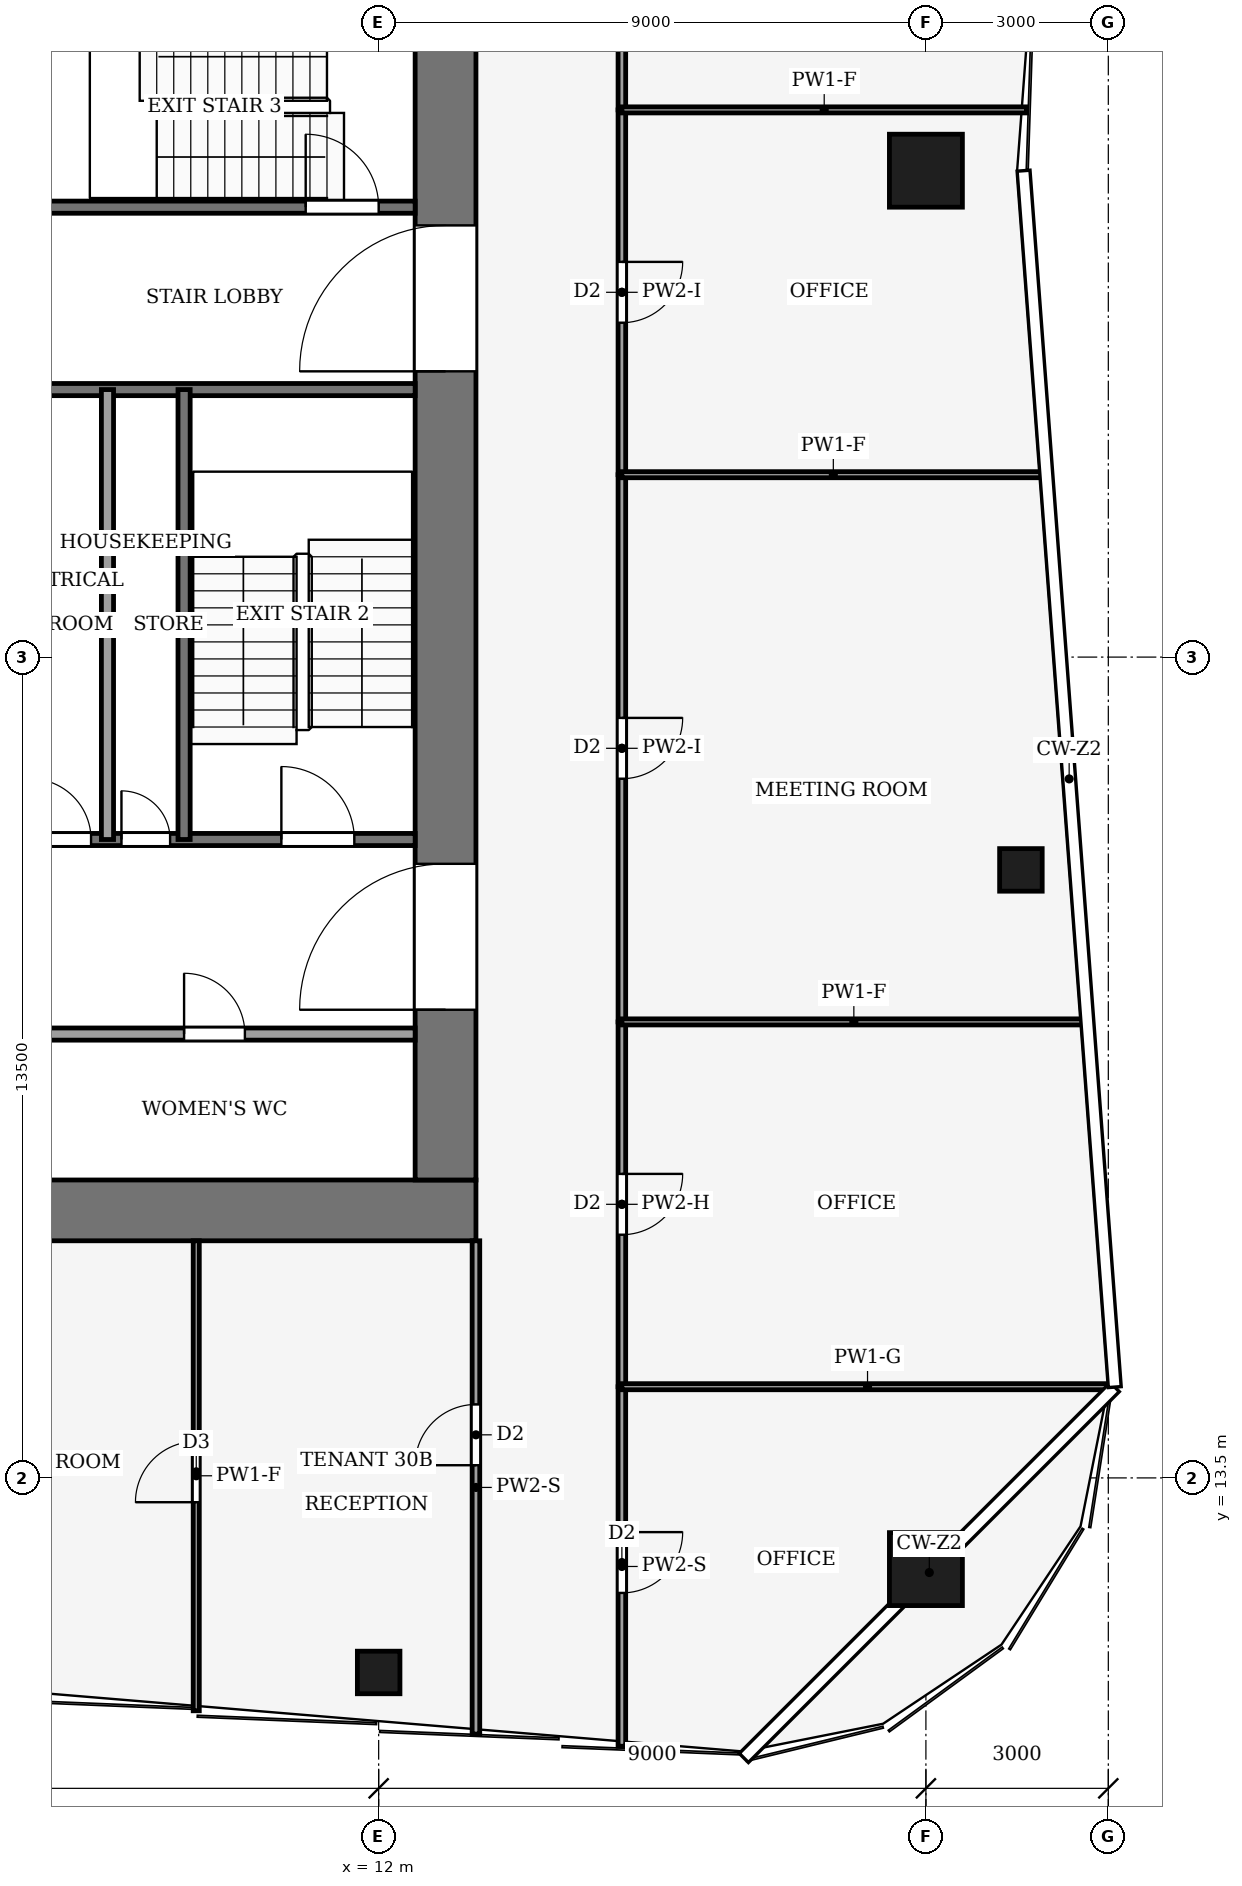
"""IFC4 building model, lengths in metres.
Left out: names, types, materials, properties, quantities, classifications, styles, units other than length and angle.
Written with IfcOpenShell. Run it as: python <this file> out.ifc"""

import sys

from ifc_helpers import new_model, si_unit, direction, frame, frame_2d, origin, origin_2d, place, context, subcontext, project, spatial, rectangle, hollow_rectangle, extrude, element, fill, save


model = new_model("IFC4")
c1 = context("Model", 3, precision=1e-05, world=origin(), true_north=direction((0.0, 1.0)))
c2 = subcontext(c1, "Body", "Model", "MODEL_VIEW")
j1 = project(units=[si_unit("LENGTHUNIT", "METRE"), si_unit("PLANEANGLEUNIT", "RADIAN")], contexts=[c1])
p1 = place(None, origin())
s1 = spatial("IfcSite", under=j1, at=p1, CompositionType="ELEMENT")
p2 = place(p1, origin())
s2 = spatial("IfcBuilding", under=s1, at=p2, CompositionType="ELEMENT")
p3 = place(p2, frame((0.0, 0.0, 134.0)))
s3 = spatial("IfcBuildingStorey", under=s2, at=p3, CompositionType="ELEMENT", Elevation=134.0)
p4 = place(p3, frame((-13.6, 17.9, -0.13), z_axis=(0.0, 0.0, 1.0), x_axis=(1.0, 0.0, 0.0)))
e1 = element("IfcWall", 1, at=p4, inside=s3, PredefinedType="SHEAR", context=c2, shape_type="SweptSolid", body=[
    extrude(rectangle(XDim=27.2, YDim=1.0, at=frame_2d((13.6, 0.0))), origin(), (0.0, 0.0, 1.0), 4.0),
])
p5 = place(p3, frame((13.1, 18.4, -0.13), z_axis=(0.0, 0.0, 1.0), x_axis=(0.0, 1.0, 0.0)))
e2 = element("IfcWall", 2, at=p5, inside=s3, PredefinedType="SHEAR", context=c2, shape_type="SweptSolid", body=[
    extrude(rectangle(XDim=19.2, YDim=1.0, at=frame_2d((9.6, 0.0))), origin(), (0.0, 0.0, 1.0), 4.0),
])
p6 = place(p5, frame((2.8, 0.0, 0.13)))
e3 = element("IfcOpeningElement", 3, at=p6, cuts=e2, PredefinedType="OPENING", context=c2, shape_type="SweptSolid", body=[
    extrude(rectangle(XDim=2.4, YDim=2.4, at=frame_2d((1.2, 1.2))), frame((0.0, 0.51, 0.0), z_axis=(0.0, -1.0, 0.0), x_axis=(1.0, 0.0, 0.0)), (0.0, 0.0, 1.0), 1.02),
])
p7 = place(p5, frame((13.3, 0.0, 0.13)))
e4 = element("IfcOpeningElement", 4, at=p7, cuts=e2, PredefinedType="OPENING", context=c2, shape_type="SweptSolid", body=[
    extrude(rectangle(XDim=2.4, YDim=2.4, at=frame_2d((1.2, 1.2))), frame((0.0, 0.51, 0.0), z_axis=(0.0, -1.0, 0.0), x_axis=(1.0, 0.0, 0.0)), (0.0, 0.0, 1.0), 1.02),
])
for number, where, z_axis, x_axis in (
    (5, (21.0, 35.0, 0.0), (0.0, 0.0, 1.0), (1.0, 0.0, 0.0)),
    (6, (21.0, 12.0, 0.0), (0.0, 0.0, 1.0), (1.0, 0.0, 0.0)),
):
    element("IfcColumn", number, at=place(p3, frame(where, z_axis=z_axis, x_axis=x_axis)), inside=s3, PredefinedType="COLUMN", context=c2, shape_type="SweptSolid", body=[
        extrude(hollow_rectangle(XDim=1.2, YDim=1.2, WallThickness=0.07, at=origin_2d()), origin(), (0.0, 0.0, 1.0), 4.0),
    ])
for number, where, z_axis, x_axis in (
    (7, (12.0, 10.3, 0.0), (0.0, 0.0, 1.0), (1.0, 0.0, 0.0)),
    (8, (22.562, 23.5, 0.0), (0.0, 0.0, 1.0), (1.0, 0.0, 0.0)),
):
    element("IfcColumn", number, at=place(p3, frame(where, z_axis=z_axis, x_axis=x_axis)), inside=s3, PredefinedType="COLUMN", context=c2, shape_type="SweptSolid", body=[
        extrude(hollow_rectangle(XDim=0.7, YDim=0.7, WallThickness=0.03, at=origin_2d()), origin(), (0.0, 0.0, 1.0), 4.0),
    ])
p8 = place(p3, frame((6.0, 20.8, 0.0), z_axis=(0.0, 0.0, 1.0), x_axis=(1.0, 0.0, 0.0)))
e9 = element("IfcWall", 9, at=p8, inside=s3, PredefinedType="PARTITIONING", context=c2, shape_type="SweptSolid", body=[
    extrude(rectangle(XDim=6.6, YDim=0.2, at=frame_2d((3.3, 0.0))), origin(), (0.0, 0.0, 1.0), 3.87),
])
p9 = place(p8, frame((2.8, 0.0, 0.0)))
e10 = element("IfcOpeningElement", 10, at=p9, cuts=e9, PredefinedType="OPENING", context=c2, shape_type="SweptSolid", body=[
    extrude(rectangle(XDim=1.0, YDim=2.1, at=frame_2d((0.5, 1.05))), frame((0.0, 0.11, 0.0), z_axis=(0.0, -1.0, 0.0), x_axis=(1.0, 0.0, 0.0)), (0.0, 0.0, 1.0), 0.22),
])
p10 = place(p3, frame((6.0, 24.0, 0.0), z_axis=(0.0, 0.0, 1.0), x_axis=(1.0, 0.0, 0.0)))
e11 = element("IfcWall", 11, at=p10, inside=s3, PredefinedType="PARTITIONING", context=c2, shape_type="SweptSolid", body=[
    extrude(rectangle(XDim=6.6, YDim=0.2, at=frame_2d((3.3, 0.0))), origin(), (0.0, 0.0, 1.0), 3.87),
])
p11 = place(p10, frame((0.27, 0.0, 0.0)))
e12 = element("IfcOpeningElement", 12, at=p11, cuts=e11, PredefinedType="OPENING", context=c2, shape_type="SweptSolid", body=[
    extrude(rectangle(XDim=1.0, YDim=2.1, at=frame_2d((0.5, 1.05))), frame((0.0, 0.11, 0.0), z_axis=(0.0, -1.0, 0.0), x_axis=(1.0, 0.0, 0.0)), (0.0, 0.0, 1.0), 0.22),
])
p12 = place(p10, frame((1.77, 0.0, 0.0)))
e13 = element("IfcOpeningElement", 13, at=p12, cuts=e11, PredefinedType="OPENING", context=c2, shape_type="SweptSolid", body=[
    extrude(rectangle(XDim=0.8, YDim=2.1, at=frame_2d((0.4, 1.05))), frame((0.0, 0.11, 0.0), z_axis=(0.0, -1.0, 0.0), x_axis=(1.0, 0.0, 0.0)), (0.0, 0.0, 1.0), 0.22),
])
p13 = place(p10, frame((4.4, 0.0, 0.0)))
e14 = element("IfcOpeningElement", 14, at=p13, cuts=e11, PredefinedType="OPENING", context=c2, shape_type="SweptSolid", body=[
    extrude(rectangle(XDim=1.2, YDim=2.2, at=frame_2d((0.6, 1.1))), frame((0.0, 0.11, 0.0), z_axis=(0.0, -1.0, 0.0), x_axis=(1.0, 0.0, 0.0)), (0.0, 0.0, 1.0), 0.22),
])
p14 = place(p3, frame((6.0, 31.4, 0.0), z_axis=(0.0, 0.0, 1.0), x_axis=(1.0, 0.0, 0.0)))
e15 = element("IfcWall", 15, at=p14, inside=s3, PredefinedType="PARTITIONING", context=c2, shape_type="SweptSolid", body=[
    extrude(rectangle(XDim=6.6, YDim=0.2, at=frame_2d((3.3, 0.0))), origin(), (0.0, 0.0, 1.0), 3.87),
])
p15 = place(p3, frame((6.0, 34.4, 0.0), z_axis=(0.0, 0.0, 1.0), x_axis=(1.0, 0.0, 0.0)))
e16 = element("IfcWall", 16, at=p15, inside=s3, PredefinedType="PARTITIONING", context=c2, shape_type="SweptSolid", body=[
    extrude(rectangle(XDim=6.6, YDim=0.2, at=frame_2d((3.3, 0.0))), origin(), (0.0, 0.0, 1.0), 3.87),
])
p16 = place(p15, frame((4.8, 0.0, 0.0)))
e17 = element("IfcOpeningElement", 17, at=p16, cuts=e16, PredefinedType="OPENING", context=c2, shape_type="SweptSolid", body=[
    extrude(rectangle(XDim=1.2, YDim=2.2, at=frame_2d((0.6, 1.1))), frame((0.0, 0.11, 0.0), z_axis=(0.0, -1.0, 0.0), x_axis=(1.0, 0.0, 0.0)), (0.0, 0.0, 1.0), 0.22),
])
for number, where, z_axis, x_axis in (
    (18, (7.54, 24.0, 0.0), (0.0, 0.0, 1.0), (0.0, 1.0, 0.0)),
    (19, (8.8, 24.0, 0.0), (0.0, 0.0, 1.0), (0.0, 1.0, 0.0)),
):
    element("IfcWall", number, at=place(p3, frame(where, z_axis=z_axis, x_axis=x_axis)), inside=s3, PredefinedType="PARTITIONING", context=c2, shape_type="SweptSolid", body=[
        extrude(rectangle(XDim=7.4, YDim=0.2, at=frame_2d((3.7, 0.0))), origin(), (0.0, 0.0, 1.0), 3.87),
    ])
p17 = place(p3, frame((16.0, 15.0, 0.0), z_axis=(0.0, 0.0, 1.0), x_axis=(0.0, -1.0, 0.0)))
e20 = element("IfcWall", 20, at=p17, inside=s3, PredefinedType="PARTITIONING", context=c2, shape_type="SweptSolid", body=[
    extrude(rectangle(XDim=5.913, YDim=0.125, at=frame_2d((2.957, 0.0))), origin(), (0.0, 0.0, 1.0), 3.04),
])
p18 = place(p17, frame((2.392, 0.0, 0.0)))
e21 = element("IfcOpeningElement", 21, at=p18, cuts=e20, PredefinedType="OPENING", context=c2, shape_type="SweptSolid", body=[
    extrude(rectangle(XDim=1.0, YDim=2.1, at=frame_2d((0.5, 1.05))), frame((0.0, 0.073, 0.0), z_axis=(0.0, -1.0, 0.0), x_axis=(1.0, 0.0, 0.0)), (0.0, 0.0, 1.0), 0.145),
])
p19 = place(p3, frame((16.0, 21.0, 0.0), z_axis=(0.0, 0.0, 1.0), x_axis=(0.0, -1.0, 0.0)))
e22 = element("IfcWall", 22, at=p19, inside=s3, PredefinedType="PARTITIONING", context=c2, shape_type="SweptSolid", body=[
    extrude(rectangle(XDim=6.0, YDim=0.125, at=frame_2d((3.0, 0.0))), origin(), (0.0, 0.0, 1.0), 3.14),
])
p20 = place(p19, frame((2.5, 0.0, 0.0)))
e23 = element("IfcOpeningElement", 23, at=p20, cuts=e22, PredefinedType="OPENING", context=c2, shape_type="SweptSolid", body=[
    extrude(rectangle(XDim=1.0, YDim=2.1, at=frame_2d((0.5, 1.05))), frame((0.0, 0.073, 0.0), z_axis=(0.0, -1.0, 0.0), x_axis=(1.0, 0.0, 0.0)), (0.0, 0.0, 1.0), 0.145),
])
p21 = place(p3, frame((16.0, 30.0, 0.0), z_axis=(0.0, 0.0, 1.0), x_axis=(0.0, -1.0, 0.0)))
e24 = element("IfcWall", 24, at=p21, inside=s3, PredefinedType="PARTITIONING", context=c2, shape_type="SweptSolid", body=[
    extrude(rectangle(XDim=9.0, YDim=0.125, at=frame_2d((4.5, 0.0))), origin(), (0.0, 0.0, 1.0), 3.48),
])
p22 = place(p21, frame((4.0, 0.0, 0.0)))
e25 = element("IfcOpeningElement", 25, at=p22, cuts=e24, PredefinedType="OPENING", context=c2, shape_type="SweptSolid", body=[
    extrude(rectangle(XDim=1.0, YDim=2.1, at=frame_2d((0.5, 1.05))), frame((0.0, 0.073, 0.0), z_axis=(0.0, -1.0, 0.0), x_axis=(1.0, 0.0, 0.0)), (0.0, 0.0, 1.0), 0.145),
])
p23 = place(p3, frame((16.0, 36.0, 0.0), z_axis=(0.0, 0.0, 1.0), x_axis=(0.0, -1.0, 0.0)))
e26 = element("IfcWall", 26, at=p23, inside=s3, PredefinedType="PARTITIONING", context=c2, shape_type="SweptSolid", body=[
    extrude(rectangle(XDim=6.0, YDim=0.125, at=frame_2d((3.0, 0.0))), origin(), (0.0, 0.0, 1.0), 3.48),
])
p24 = place(p23, frame((2.5, 0.0, 0.0)))
e27 = element("IfcOpeningElement", 27, at=p24, cuts=e26, PredefinedType="OPENING", context=c2, shape_type="SweptSolid", body=[
    extrude(rectangle(XDim=1.0, YDim=2.1, at=frame_2d((0.5, 1.05))), frame((0.0, 0.073, 0.0), z_axis=(0.0, -1.0, 0.0), x_axis=(1.0, 0.0, 0.0)), (0.0, 0.0, 1.0), 0.145),
])
p25 = place(p3, frame((16.0, 41.004, 0.0), z_axis=(0.0, 0.0, 1.0), x_axis=(0.0, -1.0, 0.0)))
e28 = element("IfcWall", 28, at=p25, inside=s3, PredefinedType="PARTITIONING", context=c2, shape_type="SweptSolid", body=[
    extrude(rectangle(XDim=5.004, YDim=0.125, at=frame_2d((2.502, 0.0))), origin(), (0.0, 0.0, 1.0), 3.14),
])
p26 = place(p25, frame((2.002, 0.0, 0.0)))
e29 = element("IfcOpeningElement", 29, at=p26, cuts=e28, PredefinedType="OPENING", context=c2, shape_type="SweptSolid", body=[
    extrude(rectangle(XDim=1.0, YDim=2.1, at=frame_2d((0.5, 1.05))), frame((0.0, 0.073, 0.0), z_axis=(0.0, -1.0, 0.0), x_axis=(1.0, 0.0, 0.0)), (0.0, 0.0, 1.0), 0.145),
])
p27 = place(p3, frame((13.6, 9.287, 0.0), z_axis=(0.0, 0.0, 1.0), x_axis=(0.0, 1.0, 0.0)))
e30 = element("IfcWall", 30, at=p27, inside=s3, PredefinedType="PARTITIONING", context=c2, shape_type="SweptSolid", body=[
    extrude(rectangle(XDim=8.113, YDim=0.125, at=frame_2d((4.057, 0.0))), origin(), (0.0, 0.0, 1.0), 3.04),
])
p28 = place(p27, frame((4.422, 0.0, 0.0)))
e31 = element("IfcOpeningElement", 31, at=p28, cuts=e30, PredefinedType="OPENING", context=c2, shape_type="SweptSolid", body=[
    extrude(rectangle(XDim=1.0, YDim=2.1, at=frame_2d((0.5, 1.05))), frame((0.0, 0.073, 0.0), z_axis=(0.0, -1.0, 0.0), x_axis=(1.0, 0.0, 0.0)), (0.0, 0.0, 1.0), 0.145),
])
p29 = place(p3, frame((24.08, 15.0, 0.0), z_axis=(0.0, 0.0, 1.0), x_axis=(-1.0, 0.0, 0.0)))
e32 = element("IfcWall", 32, at=p29, inside=s3, PredefinedType="PARTITIONING", context=c2, shape_type="SweptSolid", body=[
    extrude(rectangle(XDim=8.08, YDim=0.1, at=frame_2d((4.04, 0.0))), origin(), (0.0, 0.0, 1.0), 2.93),
])
p30 = place(p3, frame((23.63, 21.0, 0.0), z_axis=(0.0, 0.0, 1.0), x_axis=(-1.0, 0.0, 0.0)))
e33 = element("IfcWall", 33, at=p30, inside=s3, PredefinedType="PARTITIONING", context=c2, shape_type="SweptSolid", body=[
    extrude(rectangle(XDim=7.63, YDim=0.1, at=frame_2d((3.815, 0.0))), origin(), (0.0, 0.0, 1.0), 3.04),
])
p31 = place(p3, frame((22.955, 30.0, 0.0), z_axis=(0.0, 0.0, 1.0), x_axis=(-1.0, 0.0, 0.0)))
e34 = element("IfcWall", 34, at=p31, inside=s3, PredefinedType="PARTITIONING", context=c2, shape_type="SweptSolid", body=[
    extrude(rectangle(XDim=6.955, YDim=0.1, at=frame_2d((3.478, 0.0))), origin(), (0.0, 0.0, 1.0), 3.04),
])
p32 = place(p3, frame((22.655, 36.0, 0.0), z_axis=(0.0, 0.0, 1.0), x_axis=(-1.0, 0.0, 0.0)))
e35 = element("IfcWall", 35, at=p32, inside=s3, PredefinedType="PARTITIONING", context=c2, shape_type="SweptSolid", body=[
    extrude(rectangle(XDim=6.655, YDim=0.1, at=frame_2d((3.328, 0.0))), origin(), (0.0, 0.0, 1.0), 3.04),
])
p33 = place(p3, frame((9.0, 9.67, 0.0), z_axis=(0.0, 0.0, 1.0), x_axis=(0.0, 1.0, 0.0)))
e36 = element("IfcWall", 36, at=p33, inside=s3, PredefinedType="PARTITIONING", context=c2, shape_type="SweptSolid", body=[
    extrude(rectangle(XDim=7.73, YDim=0.1, at=frame_2d((3.865, 0.0))), origin(), (0.0, 0.0, 1.0), 3.04),
])
p34 = place(p33, frame((3.43, 0.0, 0.0)))
e37 = element("IfcOpeningElement", 37, at=p34, cuts=e36, PredefinedType="OPENING", context=c2, shape_type="SweptSolid", body=[
    extrude(rectangle(XDim=1.0, YDim=2.1, at=frame_2d((0.5, 1.05))), frame((0.0, 0.06, 0.0), z_axis=(0.0, -1.0, 0.0), x_axis=(1.0, 0.0, 0.0)), (0.0, 0.0, 1.0), 0.12),
])
p35 = place(p9, origin())
e38 = element("IfcDoor", 38, at=p35, inside=s3, OperationType="SINGLE_SWING_RIGHT", PredefinedType="DOOR", context=c2, shape_type="SweptSolid", body=[
    extrude(rectangle(XDim=1.0, YDim=2.1, at=frame_2d((0.5, 1.05))), frame((0.0, 0.025, 0.0), z_axis=(0.0, -1.0, 0.0), x_axis=(1.0, 0.0, 0.0)), (0.0, 0.0, 1.0), 0.05),
])
fill(e10, e38)
p36 = place(p11, origin())
e39 = element("IfcDoor", 39, at=p36, inside=s3, OperationType="SINGLE_SWING_RIGHT", PredefinedType="DOOR", context=c2, shape_type="SweptSolid", body=[
    extrude(rectangle(XDim=1.0, YDim=2.1, at=frame_2d((0.5, 1.05))), frame((0.0, 0.025, 0.0), z_axis=(0.0, -1.0, 0.0), x_axis=(1.0, 0.0, 0.0)), (0.0, 0.0, 1.0), 0.05),
])
fill(e12, e39)
p37 = place(p12, origin())
e40 = element("IfcDoor", 40, at=p37, inside=s3, OperationType="SINGLE_SWING_LEFT", PredefinedType="DOOR", context=c2, shape_type="SweptSolid", body=[
    extrude(rectangle(XDim=0.8, YDim=2.1, at=frame_2d((0.4, 1.05))), frame((0.0, 0.025, 0.0), z_axis=(0.0, -1.0, 0.0), x_axis=(1.0, 0.0, 0.0)), (0.0, 0.0, 1.0), 0.05),
])
fill(e13, e40)
p38 = place(p13, origin())
e41 = element("IfcDoor", 41, at=p38, inside=s3, OperationType="SINGLE_SWING_RIGHT", PredefinedType="DOOR", context=c2, shape_type="SweptSolid", body=[
    extrude(rectangle(XDim=1.2, YDim=2.2, at=frame_2d((0.6, 1.1))), frame((0.0, 0.025, 0.0), z_axis=(0.0, -1.0, 0.0), x_axis=(1.0, 0.0, 0.0)), (0.0, 0.0, 1.0), 0.05),
])
fill(e14, e41)
p39 = place(p16, origin())
e42 = element("IfcDoor", 42, at=p39, inside=s3, OperationType="SINGLE_SWING_LEFT", PredefinedType="DOOR", context=c2, shape_type="SweptSolid", body=[
    extrude(rectangle(XDim=1.2, YDim=2.2, at=frame_2d((0.6, 1.1))), frame((0.0, 0.025, 0.0), z_axis=(0.0, -1.0, 0.0), x_axis=(1.0, 0.0, 0.0)), (0.0, 0.0, 1.0), 0.05),
])
fill(e17, e42)
p40 = place(p6, origin())
e43 = element("IfcDoor", 43, at=p40, inside=s3, OperationType="DOUBLE_DOOR_SINGLE_SWING", PredefinedType="DOOR", context=c2, shape_type="SweptSolid", body=[
    extrude(rectangle(XDim=2.4, YDim=2.4, at=frame_2d((1.2, 1.2))), frame((0.0, 0.025, 0.0), z_axis=(0.0, -1.0, 0.0), x_axis=(1.0, 0.0, 0.0)), (0.0, 0.0, 1.0), 0.05),
])
fill(e3, e43)
p41 = place(p7, origin())
e44 = element("IfcDoor", 44, at=p41, inside=s3, OperationType="DOUBLE_DOOR_SINGLE_SWING", PredefinedType="DOOR", context=c2, shape_type="SweptSolid", body=[
    extrude(rectangle(XDim=2.4, YDim=2.4, at=frame_2d((1.2, 1.2))), frame((0.0, 0.025, 0.0), z_axis=(0.0, -1.0, 0.0), x_axis=(1.0, 0.0, 0.0)), (0.0, 0.0, 1.0), 0.05),
])
fill(e4, e44)
p42 = place(p18, origin())
e45 = element("IfcDoor", 45, at=p42, inside=s3, OperationType="SINGLE_SWING_LEFT", PredefinedType="DOOR", context=c2, shape_type="SweptSolid", body=[
    extrude(rectangle(XDim=1.0, YDim=2.1, at=frame_2d((0.5, 1.05))), frame((0.0, 0.025, 0.0), z_axis=(0.0, -1.0, 0.0), x_axis=(1.0, 0.0, 0.0)), (0.0, 0.0, 1.0), 0.05),
])
fill(e21, e45)
p43 = place(p20, origin())
e46 = element("IfcDoor", 46, at=p43, inside=s3, OperationType="SINGLE_SWING_RIGHT", PredefinedType="DOOR", context=c2, shape_type="SweptSolid", body=[
    extrude(rectangle(XDim=1.0, YDim=2.1, at=frame_2d((0.5, 1.05))), frame((0.0, 0.025, 0.0), z_axis=(0.0, -1.0, 0.0), x_axis=(1.0, 0.0, 0.0)), (0.0, 0.0, 1.0), 0.05),
])
fill(e23, e46)
p44 = place(p22, origin())
e47 = element("IfcDoor", 47, at=p44, inside=s3, OperationType="SINGLE_SWING_LEFT", PredefinedType="DOOR", context=c2, shape_type="SweptSolid", body=[
    extrude(rectangle(XDim=1.0, YDim=2.1, at=frame_2d((0.5, 1.05))), frame((0.0, 0.025, 0.0), z_axis=(0.0, -1.0, 0.0), x_axis=(1.0, 0.0, 0.0)), (0.0, 0.0, 1.0), 0.05),
])
fill(e25, e47)
p45 = place(p24, origin())
e48 = element("IfcDoor", 48, at=p45, inside=s3, OperationType="SINGLE_SWING_RIGHT", PredefinedType="DOOR", context=c2, shape_type="SweptSolid", body=[
    extrude(rectangle(XDim=1.0, YDim=2.1, at=frame_2d((0.5, 1.05))), frame((0.0, 0.025, 0.0), z_axis=(0.0, -1.0, 0.0), x_axis=(1.0, 0.0, 0.0)), (0.0, 0.0, 1.0), 0.05),
])
fill(e27, e48)
p46 = place(p28, origin())
e49 = element("IfcDoor", 49, at=p46, inside=s3, OperationType="SINGLE_SWING_RIGHT", PredefinedType="DOOR", context=c2, shape_type="SweptSolid", body=[
    extrude(rectangle(XDim=1.0, YDim=2.1, at=frame_2d((0.5, 1.05))), frame((0.0, 0.025, 0.0), z_axis=(0.0, -1.0, 0.0), x_axis=(1.0, 0.0, 0.0)), (0.0, 0.0, 1.0), 0.05),
])
fill(e31, e49)
p47 = place(p34, origin())
e50 = element("IfcDoor", 50, at=p47, inside=s3, OperationType="SINGLE_SWING_RIGHT", PredefinedType="DOOR", context=c2, shape_type="SweptSolid", body=[
    extrude(rectangle(XDim=1.0, YDim=2.1, at=frame_2d((0.5, 1.05))), frame((0.0, 0.025, 0.0), z_axis=(0.0, -1.0, 0.0), x_axis=(1.0, 0.0, 0.0)), (0.0, 0.0, 1.0), 0.05),
])
fill(e37, e50)
save(model, sys.argv[1])
